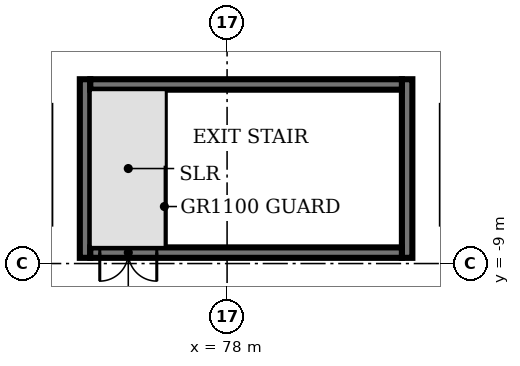
"""IFC4 building model, lengths in metres.
Left out: names, types, materials, properties, quantities, classifications, styles, units other than length and angle.
Written with IfcOpenShell. Run it as: python <this file> out.ifc"""

import sys

from ifc_helpers import new_model, si_unit, direction, frame, frame_2d, origin, place, context, subcontext, project, spatial, rectangle, extrude, element, fill, save


model = new_model("IFC4")
c1 = context("Model", 3, precision=1e-05, world=origin(), true_north=direction((0.0, 1.0)))
c2 = subcontext(c1, "Body", "Model", "MODEL_VIEW")
j1 = project(units=[si_unit("LENGTHUNIT", "METRE"), si_unit("PLANEANGLEUNIT", "RADIAN")], contexts=[c1])
p1 = place(None, origin())
s1 = spatial("IfcSite", under=j1, at=p1, CompositionType="ELEMENT")
p2 = place(p1, origin())
s2 = spatial("IfcBuilding", under=s1, at=p2, CompositionType="ELEMENT")
p3 = place(p2, frame((0.0, 0.0, 11.0)))
s3 = spatial("IfcBuildingStorey", under=s2, at=p3, CompositionType="ELEMENT", Elevation=11.0)
for number, where, z_axis, x_axis in (
    (1, (74.262, -8.85, 0.0), (0.0, 0.0, 1.0), (0.0, 1.0, 0.0)),
    (2, (82.738, -8.85, 0.0), (0.0, 0.0, 1.0), (0.0, 1.0, 0.0)),
):
    element("IfcWall", number, at=place(p3, frame(where, z_axis=z_axis, x_axis=x_axis)), inside=s3, PredefinedType="SHEAR", context=c2, shape_type="SweptSolid", body=[
        extrude(rectangle(XDim=4.7, YDim=0.275, at=frame_2d((2.35, 0.0))), origin(), (0.0, 0.0, 1.0), 3.0),
    ])
p4 = place(p3, frame((82.6, -8.712, 0.0), z_axis=(0.0, 0.0, 1.0), x_axis=(-1.0, 0.0, 0.0)))
e3 = element("IfcWall", 3, at=p4, inside=s3, PredefinedType="SHEAR", context=c2, shape_type="SweptSolid", body=[
    extrude(rectangle(XDim=8.2, YDim=0.275, at=frame_2d((4.1, 0.0))), origin(), (0.0, 0.0, 1.0), 3.0),
])
p5 = place(p4, frame((6.45, 0.0, 0.0)))
e4 = element("IfcOpeningElement", 4, at=p5, cuts=e3, PredefinedType="OPENING", context=c2, shape_type="SweptSolid", body=[
    extrude(rectangle(XDim=1.5, YDim=2.1, at=frame_2d((0.75, 1.05))), frame((0.0, 0.147, 0.0), z_axis=(0.0, -1.0, 0.0), x_axis=(1.0, 0.0, 0.0)), (0.0, 0.0, 1.0), 0.295),
])
p6 = place(p3, frame((74.4, -4.288, 0.0), z_axis=(0.0, 0.0, 1.0), x_axis=(1.0, 0.0, 0.0)))
e5 = element("IfcWall", 5, at=p6, inside=s3, PredefinedType="SHEAR", context=c2, shape_type="SweptSolid", body=[
    extrude(rectangle(XDim=8.2, YDim=0.275, at=frame_2d((4.1, 0.0))), origin(), (0.0, 0.0, 1.0), 3.0),
])
p7 = place(p5, origin())
e6 = element("IfcDoor", 6, at=p7, inside=s3, OperationType="DOUBLE_DOOR_SINGLE_SWING", PredefinedType="DOOR", context=c2, shape_type="SweptSolid", body=[
    extrude(rectangle(XDim=1.5, YDim=2.1, at=frame_2d((0.75, 1.05))), frame((0.0, 0.025, 0.0), z_axis=(0.0, -1.0, 0.0), x_axis=(1.0, 0.0, 0.0)), (0.0, 0.0, 1.0), 0.05),
])
fill(e4, e6)
save(model, sys.argv[1])
